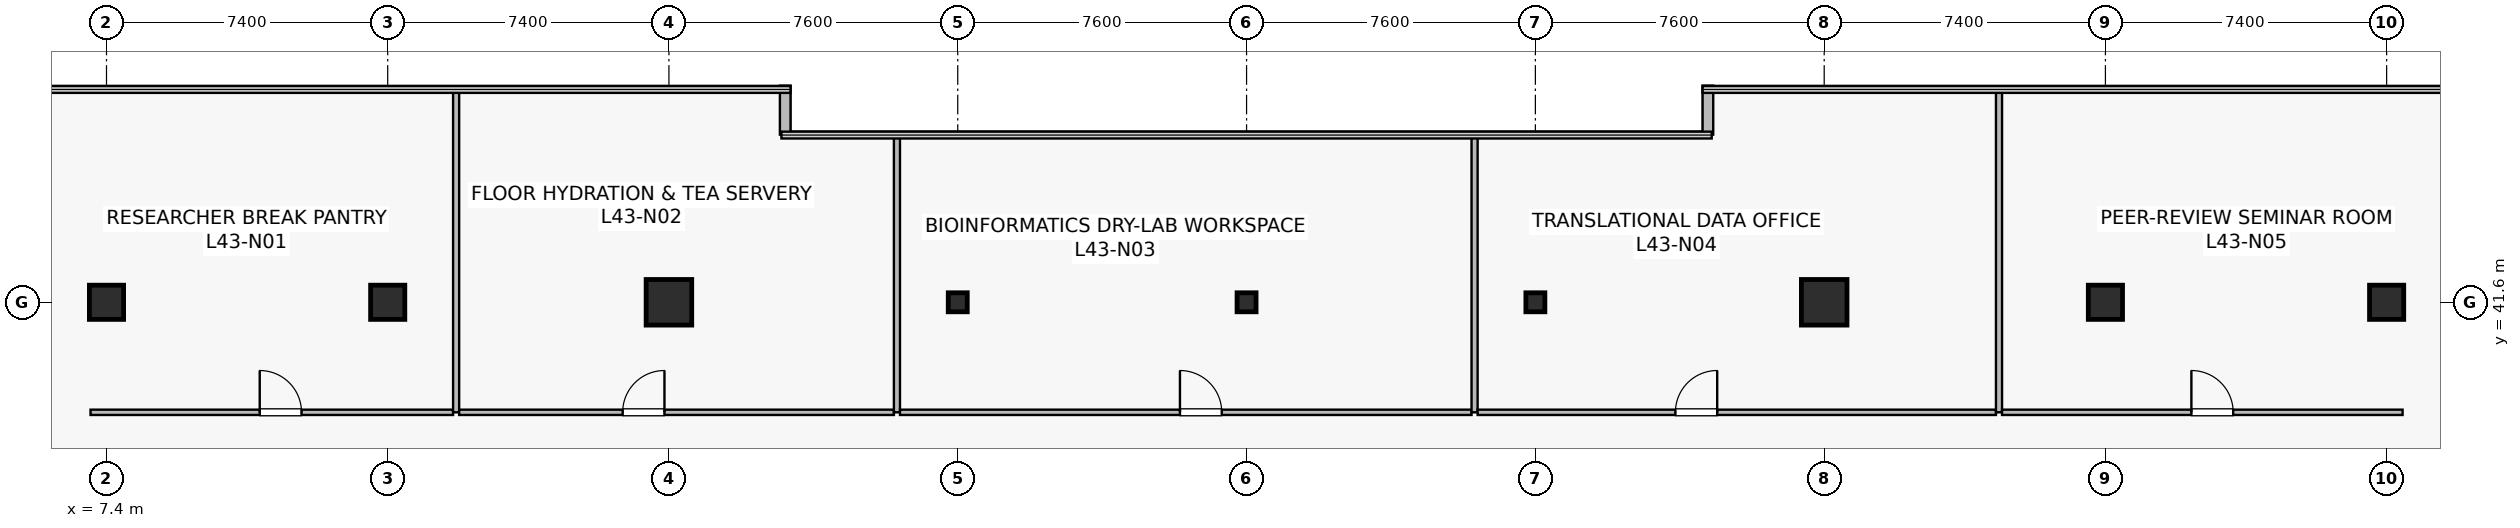
"""IFC4 building model, lengths in metres.
Left out: names, types, materials, properties, quantities, classifications, styles, units other than length and angle.
Written with IfcOpenShell. Run it as: python <this file> out.ifc"""

import sys

from ifc_helpers import new_model, si_unit, direction, frame, frame_2d, origin, origin_2d, place, context, subcontext, project, spatial, rectangle, hollow_rectangle, extrude, source, transform, mapped, element, fill, save


model = new_model("IFC4")
c1 = context("Model", 3, precision=1e-05, world=origin(), true_north=direction((0.0, 1.0)))
c2 = subcontext(c1, "Body", "Model", "MODEL_VIEW")
j1 = project(units=[si_unit("LENGTHUNIT", "METRE"), si_unit("PLANEANGLEUNIT", "RADIAN")], contexts=[c1])
p1 = place(None, origin())
s1 = spatial("IfcSite", under=j1, at=p1, CompositionType="ELEMENT")
p2 = place(p1, origin())
s2 = spatial("IfcBuilding", under=s1, at=p2, CompositionType="ELEMENT")
p3 = place(p2, frame((0.0, 0.0, 178.9)))
s3 = spatial("IfcBuildingStorey", under=s2, at=p3, CompositionType="ELEMENT", Elevation=178.9)
m1 = source(origin(), c2, "Body", "SweptSolid", [
    extrude(rectangle(XDim=0.9, YDim=0.9, at=origin_2d()), origin(), (0.0, 0.0, 1.0), 4.1),
])
p4 = place(p3, frame((14.8, 41.6, 0.0), z_axis=(0.0, 0.0, 1.0), x_axis=(1.0, 0.0, 0.0)))
e1 = element("IfcColumn", 1, at=p4, inside=s3, PredefinedType="COLUMN", context=c2, shape_type="MappedRepresentation", body=[
    mapped(m1, transform((0.0, 0.0, 0.0), scale=1.0)),
])
m2 = source(origin(), c2, "Body", "SweptSolid", [
    extrude(rectangle(XDim=1.2, YDim=1.2, at=origin_2d()), origin(), (0.0, 0.0, 1.0), 4.1),
])
for number, where, z_axis, x_axis in (
    (2, (22.2, 41.6, 0.0), (0.0, 0.0, 1.0), (1.0, 0.0, 0.0)),
    (3, (52.6, 41.6, 0.0), (0.0, 0.0, 1.0), (1.0, 0.0, 0.0)),
):
    element("IfcColumn", number, at=place(p3, frame(where, z_axis=z_axis, x_axis=x_axis)), inside=s3, PredefinedType="COLUMN", context=c2, shape_type="MappedRepresentation", body=[
        mapped(m2, transform((0.0, 0.0, 0.0), scale=1.0)),
    ])
for number, where, z_axis, x_axis in (
    (4, (60.0, 41.6, 0.0), (0.0, 0.0, 1.0), (1.0, 0.0, 0.0)),
    (5, (7.4, 41.6, 0.0), (0.0, 0.0, 1.0), (1.0, 0.0, 0.0)),
    (6, (67.4, 41.6, 0.0), (0.0, 0.0, 1.0), (1.0, 0.0, 0.0)),
):
    element("IfcColumn", number, at=place(p3, frame(where, z_axis=z_axis, x_axis=x_axis)), inside=s3, PredefinedType="COLUMN", context=c2, shape_type="MappedRepresentation", body=[
        mapped(m1, transform((0.0, 0.0, 0.0), scale=1.0)),
    ])
m3 = source(origin(), c2, "Body", "SweptSolid", [
    extrude(hollow_rectangle(XDim=0.5, YDim=0.5, WallThickness=0.022, at=origin_2d()), origin(), (0.0, 0.0, 1.0), 4.1),
])
for number, where, z_axis, x_axis in (
    (7, (29.8, 41.6, 0.0), (0.0, 0.0, 1.0), (1.0, 0.0, 0.0)),
    (8, (37.4, 41.6, 0.0), (0.0, 0.0, 1.0), (1.0, 0.0, 0.0)),
    (9, (45.0, 41.6, 0.0), (0.0, 0.0, 1.0), (1.0, 0.0, 0.0)),
):
    element("IfcColumn", number, at=place(p3, frame(where, z_axis=z_axis, x_axis=x_axis)), inside=s3, PredefinedType="COLUMN", context=c2, shape_type="MappedRepresentation", body=[
        mapped(m3, transform((0.0, 0.0, 0.0), scale=1.0)),
    ])
for number, where, z_axis, x_axis in (
    (10, (49.54, 47.3, 0.0), (0.0, 0.0, 1.0), (0.0, -1.0, 0.0)),
    (11, (25.26, 46.012, 0.0), (0.0, 0.0, 1.0), (0.0, 1.0, 0.0)),
):
    element("IfcWall", number, at=place(p3, frame(where, z_axis=z_axis, x_axis=x_axis)), inside=s3, PredefinedType="STANDARD", context=c2, shape_type="SweptSolid", body=[
        extrude(rectangle(XDim=1.288, YDim=0.28, at=frame_2d((0.644, 0.0))), origin(), (0.0, 0.0, 1.0), 3.79),
    ])
p5 = place(p3, frame((6.98, 38.705, 0.0), z_axis=(0.0, 0.0, 1.0), x_axis=(1.0, 0.0, 0.0)))
e12 = element("IfcWall", 12, at=p5, inside=s3, PredefinedType="PARTITIONING", context=c2, shape_type="SweptSolid", body=[
    extrude(rectangle(XDim=9.54, YDim=0.14, at=frame_2d((4.77, 0.0))), origin(), (0.0, 0.0, 1.0), 3.187),
])
p6 = place(p5, frame((4.452, 0.0, 0.0)))
e13 = element("IfcOpeningElement", 13, at=p6, cuts=e12, PredefinedType="OPENING", context=c2, shape_type="SweptSolid", body=[
    extrude(rectangle(XDim=1.1, YDim=2.18, at=frame_2d((0.55, 1.09))), frame((0.0, 0.08, 0.0), z_axis=(0.0, -1.0, 0.0), x_axis=(1.0, 0.0, 0.0)), (0.0, 0.0, 1.0), 0.16),
])
p7 = place(p3, frame((16.6, 38.705, 0.0), z_axis=(0.0, 0.0, 1.0), x_axis=(0.0, 1.0, 0.0)))
e14 = element("IfcWall", 14, at=p7, inside=s3, PredefinedType="PARTITIONING", context=c2, shape_type="SweptSolid", body=[
    extrude(rectangle(XDim=8.485, YDim=0.16, at=frame_2d((4.242, 0.0))), origin(), (0.0, 0.0, 1.0), 3.075),
])
p8 = place(p3, frame((16.68, 38.705, 0.0), z_axis=(0.0, 0.0, 1.0), x_axis=(1.0, 0.0, 0.0)))
e15 = element("IfcWall", 15, at=p8, inside=s3, PredefinedType="PARTITIONING", context=c2, shape_type="SweptSolid", body=[
    extrude(rectangle(XDim=11.44, YDim=0.14, at=frame_2d((5.72, 0.0))), origin(), (0.0, 0.0, 1.0), 3.187),
])
p9 = place(p8, frame((4.302, 0.0, 0.0)))
e16 = element("IfcOpeningElement", 16, at=p9, cuts=e15, PredefinedType="OPENING", context=c2, shape_type="SweptSolid", body=[
    extrude(rectangle(XDim=1.1, YDim=2.18, at=frame_2d((0.55, 1.09))), frame((0.0, 0.08, 0.0), z_axis=(0.0, -1.0, 0.0), x_axis=(1.0, 0.0, 0.0)), (0.0, 0.0, 1.0), 0.16),
])
p10 = place(p3, frame((28.2, 38.705, 0.0), z_axis=(0.0, 0.0, 1.0), x_axis=(0.0, 1.0, 0.0)))
e17 = element("IfcWall", 17, at=p10, inside=s3, PredefinedType="PARTITIONING", context=c2, shape_type="SweptSolid", body=[
    extrude(rectangle(XDim=7.285, YDim=0.16, at=frame_2d((3.643, 0.0))), origin(), (0.0, 0.0, 1.0), 3.075),
])
p11 = place(p3, frame((28.28, 38.705, 0.0), z_axis=(0.0, 0.0, 1.0), x_axis=(1.0, 0.0, 0.0)))
e18 = element("IfcWall", 18, at=p11, inside=s3, PredefinedType="PARTITIONING", context=c2, shape_type="SweptSolid", body=[
    extrude(rectangle(XDim=15.04, YDim=0.14, at=frame_2d((7.52, 0.0))), origin(), (0.0, 0.0, 1.0), 3.187),
])
p12 = place(p11, frame((7.367, 0.0, 0.0)))
e19 = element("IfcOpeningElement", 19, at=p12, cuts=e18, PredefinedType="OPENING", context=c2, shape_type="SweptSolid", body=[
    extrude(rectangle(XDim=1.1, YDim=2.18, at=frame_2d((0.55, 1.09))), frame((0.0, 0.08, 0.0), z_axis=(0.0, -1.0, 0.0), x_axis=(1.0, 0.0, 0.0)), (0.0, 0.0, 1.0), 0.16),
])
p13 = place(p3, frame((43.4, 38.705, 0.0), z_axis=(0.0, 0.0, 1.0), x_axis=(0.0, 1.0, 0.0)))
e20 = element("IfcWall", 20, at=p13, inside=s3, PredefinedType="PARTITIONING", context=c2, shape_type="SweptSolid", body=[
    extrude(rectangle(XDim=7.285, YDim=0.16, at=frame_2d((3.643, 0.0))), origin(), (0.0, 0.0, 1.0), 3.075),
])
p14 = place(p3, frame((43.48, 38.705, 0.0), z_axis=(0.0, 0.0, 1.0), x_axis=(1.0, 0.0, 0.0)))
e21 = element("IfcWall", 21, at=p14, inside=s3, PredefinedType="PARTITIONING", context=c2, shape_type="SweptSolid", body=[
    extrude(rectangle(XDim=13.64, YDim=0.14, at=frame_2d((6.82, 0.0))), origin(), (0.0, 0.0, 1.0), 3.187),
])
p15 = place(p14, frame((5.204, 0.0, 0.0)))
e22 = element("IfcOpeningElement", 22, at=p15, cuts=e21, PredefinedType="OPENING", context=c2, shape_type="SweptSolid", body=[
    extrude(rectangle(XDim=1.1, YDim=2.18, at=frame_2d((0.55, 1.09))), frame((0.0, 0.08, 0.0), z_axis=(0.0, -1.0, 0.0), x_axis=(1.0, 0.0, 0.0)), (0.0, 0.0, 1.0), 0.16),
])
p16 = place(p3, frame((57.2, 38.705, 0.0), z_axis=(0.0, 0.0, 1.0), x_axis=(0.0, 1.0, 0.0)))
e23 = element("IfcWall", 23, at=p16, inside=s3, PredefinedType="PARTITIONING", context=c2, shape_type="SweptSolid", body=[
    extrude(rectangle(XDim=8.485, YDim=0.16, at=frame_2d((4.242, 0.0))), origin(), (0.0, 0.0, 1.0), 3.075),
])
p17 = place(p3, frame((57.28, 38.705, 0.0), z_axis=(0.0, 0.0, 1.0), x_axis=(1.0, 0.0, 0.0)))
e24 = element("IfcWall", 24, at=p17, inside=s3, PredefinedType="PARTITIONING", context=c2, shape_type="SweptSolid", body=[
    extrude(rectangle(XDim=10.54, YDim=0.14, at=frame_2d((5.27, 0.0))), origin(), (0.0, 0.0, 1.0), 3.187),
])
p18 = place(p17, frame((4.982, 0.0, 0.0)))
e25 = element("IfcOpeningElement", 25, at=p18, cuts=e24, PredefinedType="OPENING", context=c2, shape_type="SweptSolid", body=[
    extrude(rectangle(XDim=1.1, YDim=2.18, at=frame_2d((0.55, 1.09))), frame((0.0, 0.08, 0.0), z_axis=(0.0, -1.0, 0.0), x_axis=(1.0, 0.0, 0.0)), (0.0, 0.0, 1.0), 0.16),
])
m4 = source(origin(), c2, "Body", "SweptSolid", [
    extrude(rectangle(XDim=1.1, YDim=2.18, at=frame_2d((0.55, 1.09))), frame((0.0, 0.025, 0.0), z_axis=(0.0, -1.0, 0.0), x_axis=(1.0, 0.0, 0.0)), (0.0, 0.0, 1.0), 0.05),
])
p19 = place(p6, origin())
e26 = element("IfcDoor", 26, at=p19, inside=s3, OperationType="SINGLE_SWING_LEFT", PredefinedType="DOOR", context=c2, shape_type="MappedRepresentation", body=[
    mapped(m4, transform((0.0, 0.0, 0.0), scale=1.0)),
])
fill(e13, e26)
p20 = place(p9, origin())
e27 = element("IfcDoor", 27, at=p20, inside=s3, OperationType="SINGLE_SWING_RIGHT", PredefinedType="DOOR", context=c2, shape_type="MappedRepresentation", body=[
    mapped(m4, transform((0.0, 0.0, 0.0), scale=1.0)),
])
fill(e16, e27)
p21 = place(p12, origin())
e28 = element("IfcDoor", 28, at=p21, inside=s3, OperationType="SINGLE_SWING_LEFT", PredefinedType="DOOR", context=c2, shape_type="MappedRepresentation", body=[
    mapped(m4, transform((0.0, 0.0, 0.0), scale=1.0)),
])
fill(e19, e28)
p22 = place(p15, origin())
e29 = element("IfcDoor", 29, at=p22, inside=s3, OperationType="SINGLE_SWING_RIGHT", PredefinedType="DOOR", context=c2, shape_type="MappedRepresentation", body=[
    mapped(m4, transform((0.0, 0.0, 0.0), scale=1.0)),
])
fill(e22, e29)
p23 = place(p18, origin())
e30 = element("IfcDoor", 30, at=p23, inside=s3, OperationType="SINGLE_SWING_LEFT", PredefinedType="DOOR", context=c2, shape_type="MappedRepresentation", body=[
    mapped(m4, transform((0.0, 0.0, 0.0), scale=1.0)),
])
fill(e25, e30)
save(model, sys.argv[1])
